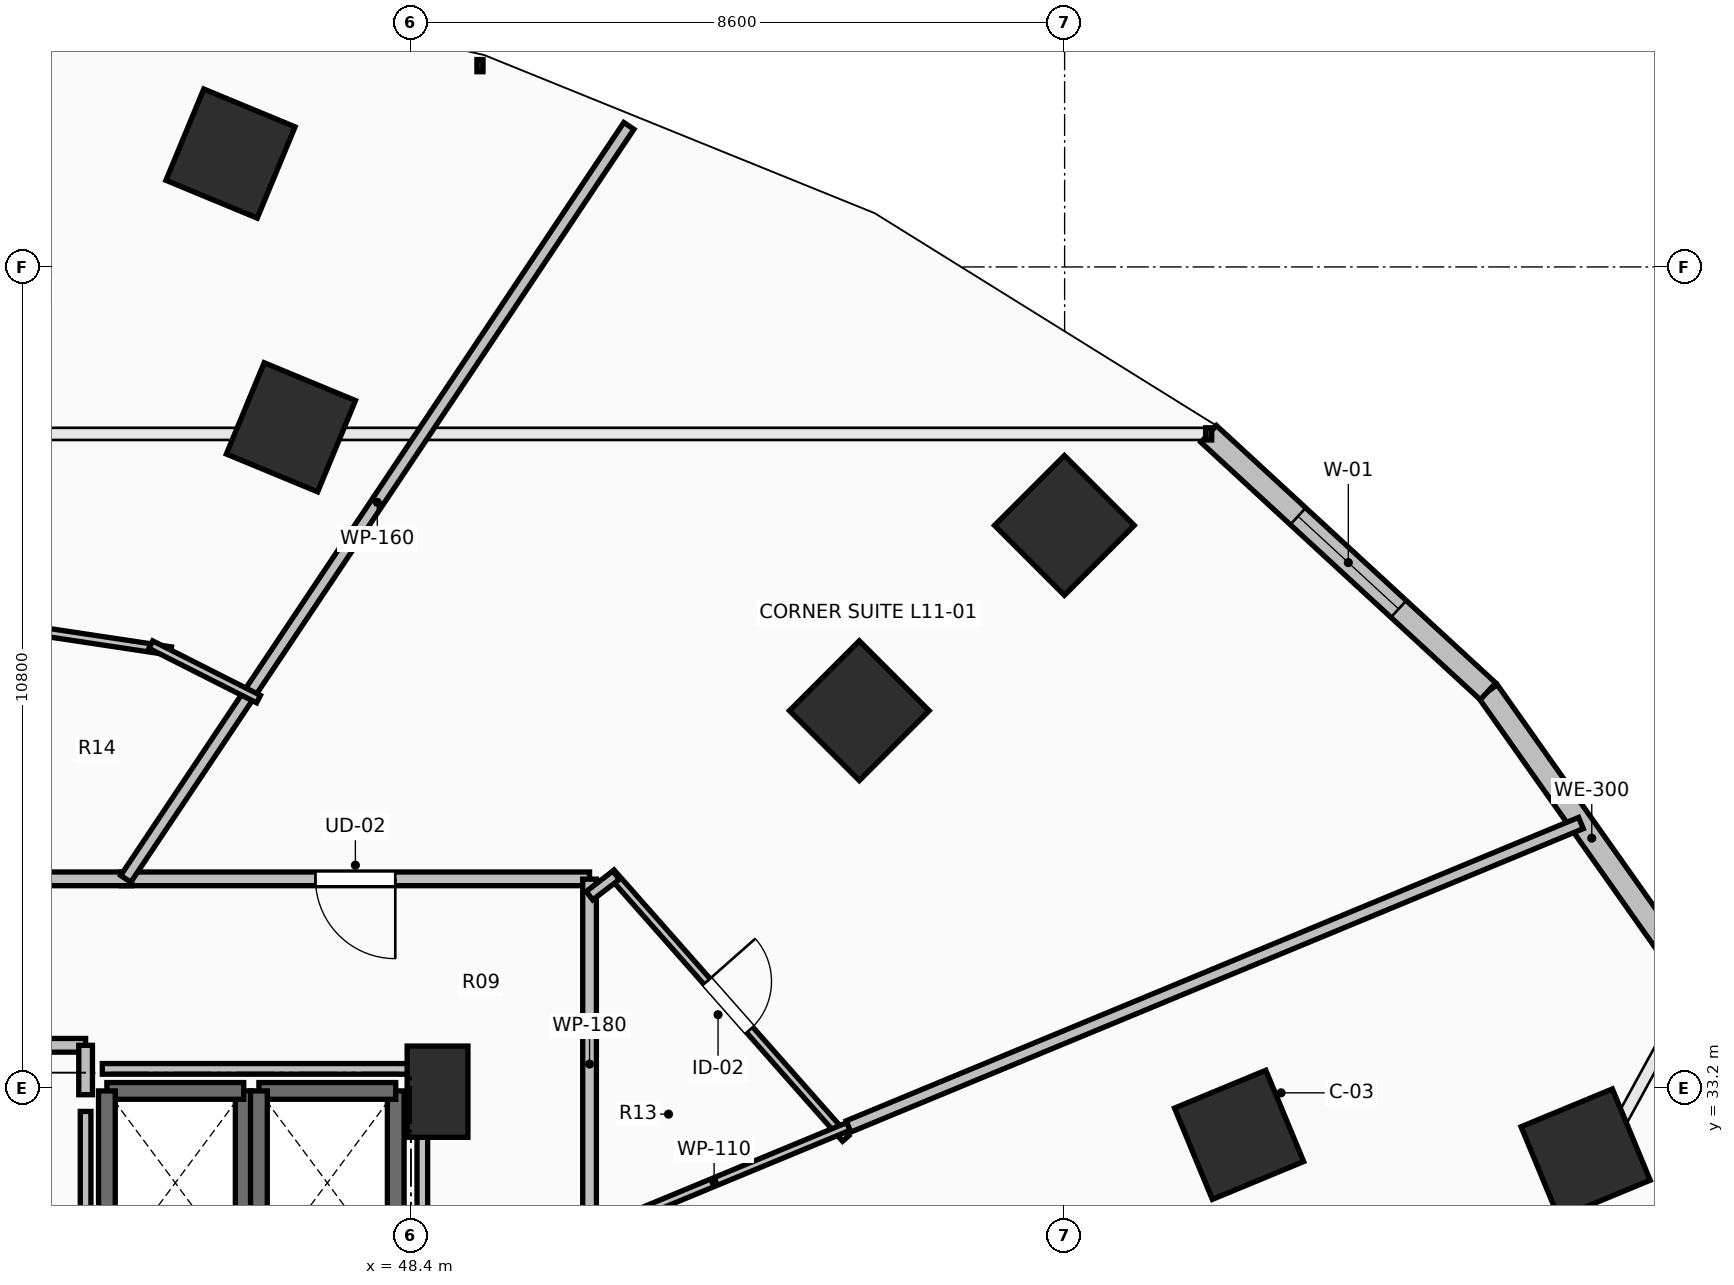
"""IFC4 building model, lengths in metres.
Left out: names, types, materials, properties, quantities, classifications, styles, units other than length and angle.
Written with IfcOpenShell. Run it as: python <this file> out.ifc"""

import sys

from ifc_helpers import new_model, si_unit, direction, frame, frame_2d, origin, origin_2d, place, context, subcontext, project, spatial, rectangle, extrude, element, fill, save


model = new_model("IFC4")
c1 = context("Model", 3, precision=1e-05, world=origin(), true_north=direction((0.0, 1.0)))
c2 = subcontext(c1, "Body", "Model", "MODEL_VIEW")
j1 = project(units=[si_unit("LENGTHUNIT", "METRE"), si_unit("PLANEANGLEUNIT", "RADIAN")], contexts=[c1])
p1 = place(None, origin())
s1 = spatial("IfcSite", under=j1, at=p1, CompositionType="ELEMENT")
p2 = place(p1, origin())
s2 = spatial("IfcBuilding", under=s1, at=p2, CompositionType="ELEMENT")
p3 = place(p2, frame((0.0, 0.0, 45.0)))
s3 = spatial("IfcBuildingStorey", under=s2, at=p3, CompositionType="ELEMENT", Elevation=45.0)
for number, where, z_axis, x_axis in (
    (1, (59.295, 32.582, 0.0), (0.0, 0.0, 1.0), (0.924, 0.383, 0.0)),
    (2, (54.299, 38.162, 0.0), (0.0, 0.0, 1.0), (0.707, 0.707, 0.0)),
    (3, (46.821, 41.891, 0.0), (0.0, 0.0, 1.0), (0.383, 0.924, 0.0)),
    (4, (63.854, 32.337, 0.0), (0.0, 0.0, 1.0), (0.924, 0.383, 0.0)),
    (5, (56.997, 40.6, 0.0), (0.0, 0.0, 1.0), (0.707, 0.707, 0.0)),
    (6, (46.026, 45.492, 0.0), (0.0, 0.0, 1.0), (0.383, 0.924, 0.0)),
):
    element("IfcColumn", number, at=place(p3, frame(where, z_axis=z_axis, x_axis=x_axis)), inside=s3, PredefinedType="COLUMN", context=c2, shape_type="SweptSolid", body=[
        extrude(rectangle(XDim=1.3, YDim=1.3, at=origin_2d()), origin(), (0.0, 0.0, 1.0), 3.5),
    ])
p4 = place(p3, frame((48.75, 33.15, 0.0), z_axis=(0.0, 0.0, 1.0), x_axis=(1.0, 0.0, 0.0)))
e7 = element("IfcColumn", 7, at=p4, inside=s3, PredefinedType="PILASTER", context=c2, shape_type="SweptSolid", body=[
    extrude(rectangle(XDim=0.8, YDim=1.2, at=origin_2d()), origin(), (0.0, 0.0, 1.0), 3.5),
])
p5 = place(p3, frame((65.301, 34.553, 0.0), z_axis=(0.0, 0.0, 1.0), x_axis=(-0.577130815624, 0.816651713803, 0.0)))
e8 = element("IfcWall", 8, at=p5, inside=s3, PredefinedType="STANDARD", context=c2, shape_type="SweptSolid", body=[
    extrude(rectangle(XDim=4.731, YDim=0.3, at=frame_2d((2.366, 0.0))), origin(), (0.0, 0.0, 1.0), 3.24),
])
p6 = place(p3, frame((62.57, 38.417, 0.0), z_axis=(0.0, 0.0, 1.0), x_axis=(-0.735342629635, 0.677695519419, 0.0)))
e9 = element("IfcWall", 9, at=p6, inside=s3, PredefinedType="STANDARD", context=c2, shape_type="SweptSolid", body=[
    extrude(rectangle(XDim=4.997, YDim=0.3, at=frame_2d((2.499, 0.0))), origin(), (0.0, 0.0, 1.0), 3.24),
])
p7 = place(p6, frame((1.599, 0.0, 0.85)))
e10 = element("IfcOpeningElement", 10, at=p7, cuts=e9, PredefinedType="OPENING", context=c2, shape_type="SweptSolid", body=[
    extrude(rectangle(XDim=1.8, YDim=2.19, at=frame_2d((0.9, 1.095))), frame((0.0, 0.165, 0.0), z_axis=(0.0, -1.0, 0.0), x_axis=(1.0, 0.0, 0.0)), (0.0, 0.0, 1.0), 0.33),
])
p8 = place(p3, frame((46.2, 30.74, 0.0), z_axis=(0.0, 0.0, 1.0), x_axis=(0.0, 1.0, 0.0)))
e11 = element("IfcWall", 11, at=p8, inside=s3, PredefinedType="SOLIDWALL", context=c2, shape_type="SweptSolid", body=[
    extrude(rectangle(XDim=2.42, YDim=0.22, at=frame_2d((1.21, 0.0))), origin(), (0.0, 0.0, 1.0), 3.24),
])
p9 = place(p3, frame((46.2, 33.16, 0.0), z_axis=(0.0, 0.0, 1.0), x_axis=(-1.0, 0.0, 0.0)))
e12 = element("IfcWall", 12, at=p9, inside=s3, PredefinedType="SOLIDWALL", context=c2, shape_type="SweptSolid", body=[
    extrude(rectangle(XDim=1.8, YDim=0.22, at=frame_2d((0.9, 0.0))), origin(), (0.0, 0.0, 1.0), 3.24),
])
for number, where, z_axis, x_axis in (
    (13, (44.4, 33.16, 0.0), (0.0, 0.0, 1.0), (0.0, -1.0, 0.0)),
    (14, (48.2, 30.74, 0.0), (0.0, 0.0, 1.0), (0.0, 1.0, 0.0)),
):
    element("IfcWall", number, at=place(p3, frame(where, z_axis=z_axis, x_axis=x_axis)), inside=s3, PredefinedType="SOLIDWALL", context=c2, shape_type="SweptSolid", body=[
        extrude(rectangle(XDim=2.42, YDim=0.22, at=frame_2d((1.21, 0.0))), origin(), (0.0, 0.0, 1.0), 3.24),
    ])
p10 = place(p3, frame((48.2, 33.16, 0.0), z_axis=(0.0, 0.0, 1.0), x_axis=(-1.0, 0.0, 0.0)))
e15 = element("IfcWall", 15, at=p10, inside=s3, PredefinedType="SOLIDWALL", context=c2, shape_type="SweptSolid", body=[
    extrude(rectangle(XDim=1.8, YDim=0.22, at=frame_2d((0.9, 0.0))), origin(), (0.0, 0.0, 1.0), 3.24),
])
p11 = place(p3, frame((46.4, 33.16, 0.0), z_axis=(0.0, 0.0, 1.0), x_axis=(0.0, -1.0, 0.0)))
e16 = element("IfcWall", 16, at=p11, inside=s3, PredefinedType="SOLIDWALL", context=c2, shape_type="SweptSolid", body=[
    extrude(rectangle(XDim=2.42, YDim=0.22, at=frame_2d((1.21, 0.0))), origin(), (0.0, 0.0, 1.0), 3.24),
])
p12 = place(p3, frame((44.12, 33.76, 0.0), z_axis=(0.0, 0.0, 1.0), x_axis=(-1.0, 0.0, 0.0)))
e17 = element("IfcWall", 17, at=p12, inside=s3, PredefinedType="PARTITIONING", context=c2, shape_type="SweptSolid", body=[
    extrude(rectangle(XDim=2.53, YDim=0.18, at=frame_2d((1.265, 0.0))), origin(), (0.0, 0.0, 1.0), 3.24),
])
p13 = place(p12, frame((0.84, 0.0, 0.0)))
e18 = element("IfcOpeningElement", 18, at=p13, cuts=e17, PredefinedType="OPENING", context=c2, shape_type="SweptSolid", body=[
    extrude(rectangle(XDim=0.85, YDim=2.1, at=frame_2d((0.425, 1.05))), frame((0.0, 0.105, 0.0), z_axis=(0.0, -1.0, 0.0), x_axis=(1.0, 0.0, 0.0)), (0.0, 0.0, 1.0), 0.21),
])
p14 = place(p3, frame((44.12, 33.11, 0.0), z_axis=(0.0, 0.0, 1.0), x_axis=(0.0, 1.0, 0.0)))
e19 = element("IfcWall", 19, at=p14, inside=s3, PredefinedType="PARTITIONING", context=c2, shape_type="SweptSolid", body=[
    extrude(rectangle(XDim=0.65, YDim=0.18, at=frame_2d((0.325, 0.0))), origin(), (0.0, 0.0, 1.0), 3.24),
])
p15 = place(p3, frame((50.75, 35.95, 0.0), z_axis=(0.0, 0.0, 1.0), x_axis=(-1.0, 0.0, 0.0)))
e20 = element("IfcWall", 20, at=p15, inside=s3, PredefinedType="PARTITIONING", context=c2, shape_type="SweptSolid", body=[
    extrude(rectangle(XDim=6.162, YDim=0.18, at=frame_2d((3.081, 0.0))), origin(), (0.0, 0.0, 1.0), 2.432),
])
p16 = place(p15, frame((2.556, 0.0, 0.0)))
e21 = element("IfcOpeningElement", 21, at=p16, cuts=e20, PredefinedType="OPENING", context=c2, shape_type="SweptSolid", body=[
    extrude(rectangle(XDim=1.05, YDim=2.2, at=frame_2d((0.525, 1.1))), frame((0.0, 0.105, 0.0), z_axis=(0.0, -1.0, 0.0), x_axis=(1.0, 0.0, 0.0)), (0.0, 0.0, 1.0), 0.21),
])
p17 = place(p3, frame((50.75, 31.081, 0.0), z_axis=(0.0, 0.0, 1.0), x_axis=(0.0, 1.0, 0.0)))
e22 = element("IfcWall", 22, at=p17, inside=s3, PredefinedType="PARTITIONING", context=c2, shape_type="SweptSolid", body=[
    extrude(rectangle(XDim=4.865, YDim=0.18, at=frame_2d((2.433, 0.0))), origin(), (0.0, 0.0, 1.0), 2.432),
])
p18 = place(p3, frame((44.728, 35.95, 0.0), z_axis=(0.0, 0.0, 1.0), x_axis=(-1.0, 0.0, 0.0)))
e23 = element("IfcWall", 23, at=p18, inside=s3, PredefinedType="PARTITIONING", context=c2, shape_type="SweptSolid", body=[
    extrude(rectangle(XDim=3.398, YDim=0.18, at=frame_2d((1.699, 0.0))), origin(), (0.0, 0.0, 1.0), 3.24),
])
p19 = place(p3, frame((51.031, 36.03, 0.0), z_axis=(0.0, 0.0, 1.0), x_axis=(0.662106207726, -0.749410014405, 0.0)))
e24 = element("IfcWall", 24, at=p19, inside=s3, PredefinedType="PARTITIONING", context=c2, shape_type="SweptSolid", body=[
    extrude(rectangle(XDim=4.665, YDim=0.11, at=frame_2d((2.332, 0.0))), origin(), (0.0, 0.0, 1.0), 2.432),
])
p20 = place(p19, frame((1.907, 0.0, 0.0)))
e25 = element("IfcOpeningElement", 25, at=p20, cuts=e24, PredefinedType="OPENING", context=c2, shape_type="SweptSolid", body=[
    extrude(rectangle(XDim=0.85, YDim=2.1, at=frame_2d((0.425, 1.05))), frame((0.0, 0.07, 0.0), z_axis=(0.0, -1.0, 0.0), x_axis=(1.0, 0.0, 0.0)), (0.0, 0.0, 1.0), 0.14),
])
p21 = place(p3, frame((54.156, 32.693, 0.0), z_axis=(0.0, 0.0, 1.0), x_axis=(-0.923803754276, -0.382866326002, 0.0)))
e26 = element("IfcWall", 26, at=p21, inside=s3, PredefinedType="PARTITIONING", context=c2, shape_type="SweptSolid", body=[
    extrude(rectangle(XDim=3.827, YDim=0.11, at=frame_2d((1.914, 0.0))), origin(), (0.0, 0.0, 1.0), 2.432),
])
p22 = place(p3, frame((51.267, 45.856, 0.0), z_axis=(0.0, 0.0, 1.0), x_axis=(-0.55557946655, -0.831463442581, 0.0)))
e27 = element("IfcWall", 27, at=p22, inside=s3, PredefinedType="PARTITIONING", context=c2, shape_type="SweptSolid", body=[
    extrude(rectangle(XDim=11.914, YDim=0.16, at=frame_2d((5.957, 0.0))), origin(), (0.0, 0.0, 1.0), 2.432),
])
p23 = place(p3, frame((54.156, 32.692, 0.0), z_axis=(0.0, 0.0, 1.0), x_axis=(0.923866486063, 0.38271492776, 0.0)))
e28 = element("IfcWall", 28, at=p23, inside=s3, PredefinedType="PARTITIONING", context=c2, shape_type="SweptSolid", body=[
    extrude(rectangle(XDim=10.431, YDim=0.16, at=frame_2d((5.215, 0.0))), origin(), (0.0, 0.0, 1.0), 2.432),
])
p24 = place(p3, frame((42.432, 39.37, 0.0), z_axis=(0.0, 0.0, 1.0), x_axis=(0.988877663763, -0.148731187416, 0.0)))
e29 = element("IfcWall", 29, at=p24, inside=s3, PredefinedType="PARTITIONING", context=c2, shape_type="SweptSolid", body=[
    extrude(rectangle(XDim=2.841, YDim=0.11, at=frame_2d((1.421, 0.0))), origin(), (0.0, 0.0, 1.0), 3.24),
])
p25 = place(p3, frame((44.978, 39.031, 0.0), z_axis=(0.0, 0.0, 1.0), x_axis=(0.892388427115, -0.451268096758, 0.0)))
e30 = element("IfcWall", 30, at=p25, inside=s3, PredefinedType="PARTITIONING", context=c2, shape_type="SweptSolid", body=[
    extrude(rectangle(XDim=1.588, YDim=0.11, at=frame_2d((0.794, 0.0))), origin(), (0.0, 0.0, 1.0), 3.24),
])
p26 = place(p3, frame((44.12, 30.48, 0.0), z_axis=(0.0, 0.0, 1.0), x_axis=(0.0, 1.0, 0.0)))
e31 = element("IfcWall", 31, at=p26, inside=s3, PredefinedType="PARTITIONING", context=c2, shape_type="SweptSolid", body=[
    extrude(rectangle(XDim=2.41, YDim=0.14, at=frame_2d((1.205, 0.0))), origin(), (0.0, 0.0, 1.0), 3.24),
])
p27 = place(p3, frame((44.34, 33.45, 0.0), z_axis=(0.0, 0.0, 1.0), x_axis=(1.0, 0.0, 0.0)))
e32 = element("IfcWall", 32, at=p27, inside=s3, PredefinedType="PARTITIONING", context=c2, shape_type="SweptSolid", body=[
    extrude(rectangle(XDim=4.21, YDim=0.14, at=frame_2d((2.105, 0.0))), origin(), (0.0, 0.0, 1.0), 2.432),
])
p28 = place(p3, frame((48.55, 33.45, 0.0), z_axis=(0.0, 0.0, 1.0), x_axis=(0.0, -1.0, 0.0)))
e33 = element("IfcWall", 33, at=p28, inside=s3, PredefinedType="PARTITIONING", context=c2, shape_type="SweptSolid", body=[
    extrude(rectangle(XDim=5.254, YDim=0.14, at=frame_2d((2.627, 0.0))), origin(), (0.0, 0.0, 1.0), 2.432),
])
p29 = place(p3, frame((51.099, 35.997, 0.0), z_axis=(0.0, 0.0, 1.0), x_axis=(-0.794185002189, -0.607676050456, 0.0)))
e34 = element("IfcWall", 34, at=p29, inside=s3, PredefinedType="PARTITIONING", context=c2, shape_type="SweptSolid", body=[
    extrude(rectangle(XDim=0.441, YDim=0.14, at=frame_2d((0.221, 0.0))), origin(), (0.0, 0.0, 1.0), 2.886),
])
p30 = place(p7, origin())
e35 = element("IfcWindow", 35, at=p30, inside=s3, PartitioningType="SINGLE_PANEL", PredefinedType="WINDOW", context=c2, shape_type="SweptSolid", body=[
    extrude(rectangle(XDim=1.8, YDim=2.19, at=frame_2d((0.9, 1.095))), frame((0.0, 0.03, 0.0), z_axis=(0.0, -1.0, 0.0), x_axis=(1.0, 0.0, 0.0)), (0.0, 0.0, 1.0), 0.06),
])
fill(e10, e35)
p31 = place(p16, origin())
e36 = element("IfcDoor", 36, at=p31, inside=s3, OperationType="SINGLE_SWING_LEFT", PredefinedType="DOOR", context=c2, shape_type="SweptSolid", body=[
    extrude(rectangle(XDim=1.05, YDim=2.2, at=frame_2d((0.525, 1.1))), frame((0.0, 0.025, 0.0), z_axis=(0.0, -1.0, 0.0), x_axis=(1.0, 0.0, 0.0)), (0.0, 0.0, 1.0), 0.05),
])
fill(e21, e36)
p32 = place(p20, origin())
e37 = element("IfcDoor", 37, at=p32, inside=s3, OperationType="SINGLE_SWING_LEFT", PredefinedType="DOOR", context=c2, shape_type="SweptSolid", body=[
    extrude(rectangle(XDim=0.85, YDim=2.1, at=frame_2d((0.425, 1.05))), frame((0.0, 0.025, 0.0), z_axis=(0.0, -1.0, 0.0), x_axis=(1.0, 0.0, 0.0)), (0.0, 0.0, 1.0), 0.05),
])
fill(e25, e37)
save(model, sys.argv[1])
